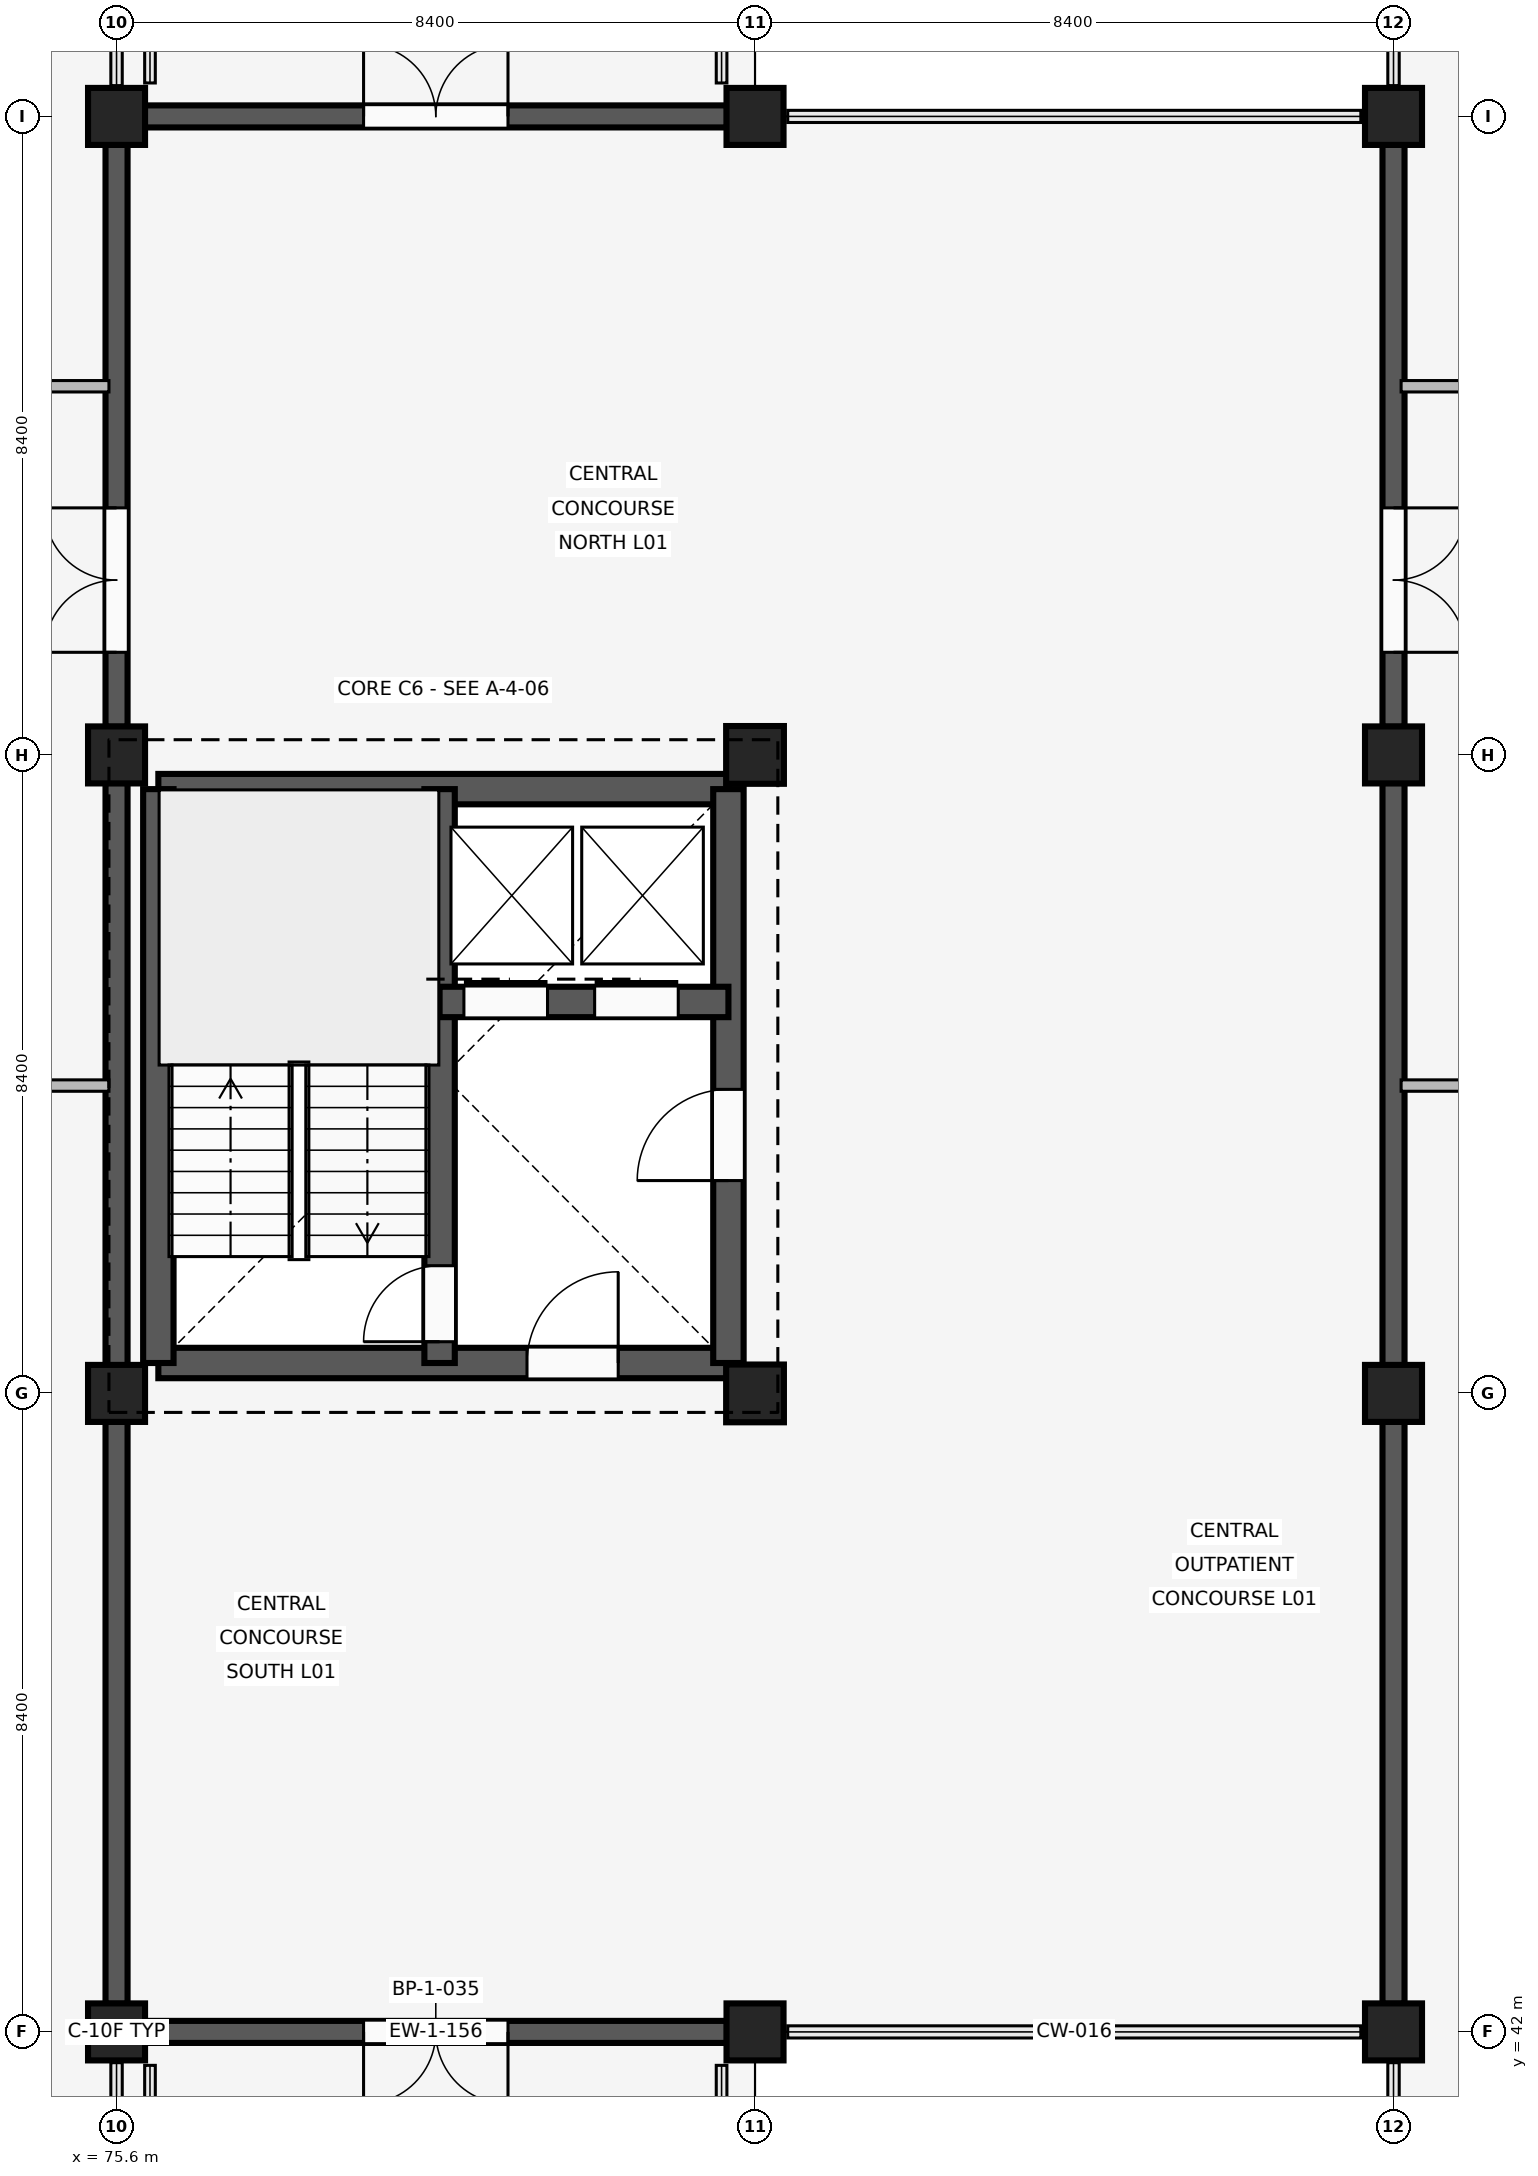
"""IFC4 building model, lengths in metres.
Left out: names, types, materials, properties, quantities, classifications, styles, units other than length and angle.
Written with IfcOpenShell. Run it as: python <this file> out.ifc"""

import sys

from ifc_helpers import new_model, si_unit, direction, frame, frame_2d, origin, origin_2d, place, context, subcontext, project, spatial, rectangle, extrude, element, fill, save


model = new_model("IFC4")
c1 = context("Model", 3, precision=1e-05, world=origin(), true_north=direction((0.0, 1.0)))
c2 = subcontext(c1, "Body", "Model", "MODEL_VIEW")
j1 = project(units=[si_unit("LENGTHUNIT", "METRE"), si_unit("PLANEANGLEUNIT", "RADIAN")], contexts=[c1])
p1 = place(None, origin())
s1 = spatial("IfcSite", under=j1, at=p1, CompositionType="ELEMENT")
p2 = place(p1, origin())
s2 = spatial("IfcBuilding", under=s1, at=p2, CompositionType="ELEMENT")
p3 = place(p2, frame((0.0, 0.0, 4.8)))
s3 = spatial("IfcBuildingStorey", under=s2, at=p3, CompositionType="ELEMENT", Elevation=4.8)
for number, where, z_axis, x_axis in (
    (1, (75.6, 42.0, 0.0), (0.0, 0.0, 1.0), (1.0, 0.0, 0.0)),
    (2, (75.6, 50.4, 0.0), (0.0, 0.0, 1.0), (1.0, 0.0, 0.0)),
    (3, (75.6, 58.8, 0.0), (0.0, 0.0, 1.0), (1.0, 0.0, 0.0)),
    (4, (75.6, 67.2, 0.0), (0.0, 0.0, 1.0), (1.0, 0.0, 0.0)),
    (5, (84.0, 42.0, 0.0), (0.0, 0.0, 1.0), (1.0, 0.0, 0.0)),
):
    element("IfcColumn", number, at=place(p3, frame(where, z_axis=z_axis, x_axis=x_axis)), inside=s3, PredefinedType="COLUMN", context=c2, shape_type="SweptSolid", body=[
        extrude(rectangle(XDim=0.75, YDim=0.75, at=origin_2d()), origin(), (0.0, 0.0, 1.0), 3.3),
    ])
for number, where, z_axis, x_axis in (
    (6, (84.0, 50.4, 0.0), (0.0, 0.0, 1.0), (1.0, 0.0, 0.0)),
    (7, (84.0, 58.8, 0.0), (0.0, 0.0, 1.0), (1.0, 0.0, 0.0)),
):
    element("IfcColumn", number, at=place(p3, frame(where, z_axis=z_axis, x_axis=x_axis)), inside=s3, PredefinedType="COLUMN", context=c2, shape_type="SweptSolid", body=[
        extrude(rectangle(XDim=0.76, YDim=0.76, at=origin_2d()), origin(), (0.0, 0.0, 1.0), 3.3),
    ])
for number, where, z_axis, x_axis in (
    (8, (84.0, 67.2, 0.0), (0.0, 0.0, 1.0), (1.0, 0.0, 0.0)),
    (9, (92.4, 42.0, 0.0), (0.0, 0.0, 1.0), (1.0, 0.0, 0.0)),
    (10, (92.4, 50.4, 0.0), (0.0, 0.0, 1.0), (1.0, 0.0, 0.0)),
    (11, (92.4, 58.8, 0.0), (0.0, 0.0, 1.0), (1.0, 0.0, 0.0)),
    (12, (92.4, 67.2, 0.0), (0.0, 0.0, 1.0), (1.0, 0.0, 0.0)),
):
    element("IfcColumn", number, at=place(p3, frame(where, z_axis=z_axis, x_axis=x_axis)), inside=s3, PredefinedType="COLUMN", context=c2, shape_type="SweptSolid", body=[
        extrude(rectangle(XDim=0.75, YDim=0.75, at=origin_2d()), origin(), (0.0, 0.0, 1.0), 3.3),
    ])
p4 = place(p3, frame((83.63, 42.0, 0.0), z_axis=(0.0, 0.0, 1.0), x_axis=(-1.0, 0.0, 0.0)))
e13 = element("IfcWall", 13, at=p4, inside=s3, PredefinedType="SOLIDWALL", context=c2, shape_type="SweptSolid", body=[
    extrude(rectangle(XDim=7.66, YDim=0.29, at=frame_2d((3.83, 0.0))), origin(), (0.0, 0.0, 1.0), 2.42),
])
p5 = place(p4, frame((2.88, 0.0, 0.0)))
e14 = element("IfcOpeningElement", 14, at=p5, cuts=e13, PredefinedType="OPENING", context=c2, shape_type="SweptSolid", body=[
    extrude(rectangle(XDim=1.9, YDim=2.3, at=frame_2d((0.95, 1.15))), frame((0.0, 0.155, 0.0), z_axis=(0.0, -1.0, 0.0), x_axis=(1.0, 0.0, 0.0)), (0.0, 0.0, 1.0), 0.31),
])
for number, where, z_axis, x_axis in (
    (15, (75.6, 42.37, 0.0), (0.0, 0.0, 1.0), (0.0, 1.0, 0.0)),
    (16, (75.6, 50.77, 0.0), (0.0, 0.0, 1.0), (0.0, 1.0, 0.0)),
):
    element("IfcWall", number, at=place(p3, frame(where, z_axis=z_axis, x_axis=x_axis)), inside=s3, PredefinedType="SOLIDWALL", context=c2, shape_type="SweptSolid", body=[
        extrude(rectangle(XDim=7.66, YDim=0.29, at=frame_2d((3.83, 0.0))), origin(), (0.0, 0.0, 1.0), 2.42),
    ])
p6 = place(p3, frame((75.97, 67.2, 0.0), z_axis=(0.0, 0.0, 1.0), x_axis=(1.0, 0.0, 0.0)))
e17 = element("IfcWall", 17, at=p6, inside=s3, PredefinedType="SOLIDWALL", context=c2, shape_type="SweptSolid", body=[
    extrude(rectangle(XDim=7.66, YDim=0.29, at=frame_2d((3.83, 0.0))), origin(), (0.0, 0.0, 1.0), 2.42),
])
p7 = place(p6, frame((2.88, 0.0, 0.0)))
e18 = element("IfcOpeningElement", 18, at=p7, cuts=e17, PredefinedType="OPENING", context=c2, shape_type="SweptSolid", body=[
    extrude(rectangle(XDim=1.9, YDim=2.3, at=frame_2d((0.95, 1.15))), frame((0.0, 0.155, 0.0), z_axis=(0.0, -1.0, 0.0), x_axis=(1.0, 0.0, 0.0)), (0.0, 0.0, 1.0), 0.31),
])
p8 = place(p3, frame((75.6, 59.17, 0.0), z_axis=(0.0, 0.0, 1.0), x_axis=(0.0, 1.0, 0.0)))
e19 = element("IfcWall", 19, at=p8, inside=s3, PredefinedType="SOLIDWALL", context=c2, shape_type="SweptSolid", body=[
    extrude(rectangle(XDim=7.66, YDim=0.29, at=frame_2d((3.83, 0.0))), origin(), (0.0, 0.0, 1.0), 2.42),
])
p9 = place(p8, frame((0.98, 0.0, 0.0)))
e20 = element("IfcOpeningElement", 20, at=p9, cuts=e19, PredefinedType="OPENING", context=c2, shape_type="SweptSolid", body=[
    extrude(rectangle(XDim=1.9, YDim=2.32, at=frame_2d((0.95, 1.16))), frame((0.0, 0.155, 0.0), z_axis=(0.0, -1.0, 0.0), x_axis=(1.0, 0.0, 0.0)), (0.0, 0.0, 1.0), 0.31),
])
for number, where, z_axis, x_axis in (
    (21, (92.4, 50.03, 0.0), (0.0, 0.0, 1.0), (0.0, -1.0, 0.0)),
    (22, (92.4, 58.43, 0.0), (0.0, 0.0, 1.0), (0.0, -1.0, 0.0)),
):
    element("IfcWall", number, at=place(p3, frame(where, z_axis=z_axis, x_axis=x_axis)), inside=s3, PredefinedType="SOLIDWALL", context=c2, shape_type="SweptSolid", body=[
        extrude(rectangle(XDim=7.66, YDim=0.29, at=frame_2d((3.83, 0.0))), origin(), (0.0, 0.0, 1.0), 2.42),
    ])
p10 = place(p3, frame((92.4, 66.83, 0.0), z_axis=(0.0, 0.0, 1.0), x_axis=(0.0, -1.0, 0.0)))
e23 = element("IfcWall", 23, at=p10, inside=s3, PredefinedType="SOLIDWALL", context=c2, shape_type="SweptSolid", body=[
    extrude(rectangle(XDim=7.66, YDim=0.29, at=frame_2d((3.83, 0.0))), origin(), (0.0, 0.0, 1.0), 2.42),
])
p11 = place(p10, frame((4.78, 0.0, 0.0)))
e24 = element("IfcOpeningElement", 24, at=p11, cuts=e23, PredefinedType="OPENING", context=c2, shape_type="SweptSolid", body=[
    extrude(rectangle(XDim=1.9, YDim=2.32, at=frame_2d((0.95, 1.16))), frame((0.0, 0.155, 0.0), z_axis=(0.0, -1.0, 0.0), x_axis=(1.0, 0.0, 0.0)), (0.0, 0.0, 1.0), 0.31),
])
p12 = place(p3, frame((76.15, 50.8, 0.0), z_axis=(0.0, 0.0, 1.0), x_axis=(1.0, 0.0, 0.0)))
e25 = element("IfcWall", 25, at=p12, inside=s3, PredefinedType="SHEAR", context=c2, shape_type="SweptSolid", body=[
    extrude(rectangle(XDim=7.5, YDim=0.4, at=frame_2d((3.75, 0.0))), origin(), (0.0, 0.0, 1.0), 3.02),
])
p13 = place(p12, frame((4.85, 0.0, 0.0)))
e26 = element("IfcOpeningElement", 26, at=p13, cuts=e25, PredefinedType="OPENING", context=c2, shape_type="SweptSolid", body=[
    extrude(rectangle(XDim=1.2, YDim=2.1, at=frame_2d((0.6, 1.05))), frame((0.0, 0.21, 0.0), z_axis=(0.0, -1.0, 0.0), x_axis=(1.0, 0.0, 0.0)), (0.0, 0.0, 1.0), 0.42),
])
p14 = place(p3, frame((76.15, 58.35, 0.0), z_axis=(0.0, 0.0, 1.0), x_axis=(1.0, 0.0, 0.0)))
e27 = element("IfcWall", 27, at=p14, inside=s3, PredefinedType="SHEAR", context=c2, shape_type="SweptSolid", body=[
    extrude(rectangle(XDim=7.5, YDim=0.4, at=frame_2d((3.75, 0.0))), origin(), (0.0, 0.0, 1.0), 3.02),
])
p15 = place(p3, frame((76.15, 50.8, 0.0), z_axis=(0.0, 0.0, 1.0), x_axis=(0.0, 1.0, 0.0)))
e28 = element("IfcWall", 28, at=p15, inside=s3, PredefinedType="SHEAR", context=c2, shape_type="SweptSolid", body=[
    extrude(rectangle(XDim=7.55, YDim=0.4, at=frame_2d((3.775, 0.0))), origin(), (0.0, 0.0, 1.0), 3.02),
])
p16 = place(p3, frame((83.65, 50.8, 0.0), z_axis=(0.0, 0.0, 1.0), x_axis=(0.0, 1.0, 0.0)))
e29 = element("IfcWall", 29, at=p16, inside=s3, PredefinedType="SHEAR", context=c2, shape_type="SweptSolid", body=[
    extrude(rectangle(XDim=7.55, YDim=0.4, at=frame_2d((3.775, 0.0))), origin(), (0.0, 0.0, 1.0), 3.02),
])
p17 = place(p16, frame((2.4, 0.0, 0.0)))
e30 = element("IfcOpeningElement", 30, at=p17, cuts=e29, PredefinedType="OPENING", context=c2, shape_type="SweptSolid", body=[
    extrude(rectangle(XDim=1.2, YDim=2.2, at=frame_2d((0.6, 1.1))), frame((0.0, 0.21, 0.0), z_axis=(0.0, -1.0, 0.0), x_axis=(1.0, 0.0, 0.0)), (0.0, 0.0, 1.0), 0.42),
])
p18 = place(p3, frame((79.85, 50.8, 0.0), z_axis=(0.0, 0.0, 1.0), x_axis=(0.0, 1.0, 0.0)))
e31 = element("IfcWall", 31, at=p18, inside=s3, PredefinedType="SHEAR", context=c2, shape_type="SweptSolid", body=[
    extrude(rectangle(XDim=7.55, YDim=0.4, at=frame_2d((3.775, 0.0))), origin(), (0.0, 0.0, 1.0), 3.02),
])
p19 = place(p18, frame((0.28, 0.0, 0.0)))
e32 = element("IfcOpeningElement", 32, at=p19, cuts=e31, PredefinedType="OPENING", context=c2, shape_type="SweptSolid", body=[
    extrude(rectangle(XDim=1.0, YDim=2.15, at=frame_2d((0.5, 1.075))), frame((0.0, 0.21, 0.0), z_axis=(0.0, -1.0, 0.0), x_axis=(1.0, 0.0, 0.0)), (0.0, 0.0, 1.0), 0.42),
])
p20 = place(p3, frame((79.85, 55.55, 0.0), z_axis=(0.0, 0.0, 1.0), x_axis=(1.0, 0.0, 0.0)))
e33 = element("IfcWall", 33, at=p20, inside=s3, PredefinedType="SHEAR", context=c2, shape_type="SweptSolid", body=[
    extrude(rectangle(XDim=3.8, YDim=0.4, at=frame_2d((1.9, 0.0))), origin(), (0.0, 0.0, 1.0), 3.02),
])
p21 = place(p20, frame((0.32, 0.0, 0.0)))
e34 = element("IfcOpeningElement", 34, at=p21, cuts=e33, PredefinedType="OPENING", context=c2, shape_type="SweptSolid", body=[
    extrude(rectangle(XDim=1.1, YDim=2.15, at=frame_2d((0.55, 1.075))), frame((0.0, 0.21, 0.0), z_axis=(0.0, -1.0, 0.0), x_axis=(1.0, 0.0, 0.0)), (0.0, 0.0, 1.0), 0.42),
])
p22 = place(p20, frame((2.04, 0.0, 0.0)))
e35 = element("IfcOpeningElement", 35, at=p22, cuts=e33, PredefinedType="OPENING", context=c2, shape_type="SweptSolid", body=[
    extrude(rectangle(XDim=1.1, YDim=2.15, at=frame_2d((0.55, 1.075))), frame((0.0, 0.21, 0.0), z_axis=(0.0, -1.0, 0.0), x_axis=(1.0, 0.0, 0.0)), (0.0, 0.0, 1.0), 0.42),
])
p23 = place(p3, frame((46.9, 54.45, 0.0), z_axis=(0.0, 0.0, 1.0), x_axis=(1.0, 0.0, 0.0)))
e36 = element("IfcWall", 36, at=p23, inside=s3, PredefinedType="PARTITIONING", context=c2, shape_type="SweptSolid", body=[
    extrude(rectangle(XDim=28.6, YDim=0.15, at=frame_2d((14.3, 0.0))), origin(), (0.0, 0.0, 1.0), 2.59),
])
p24 = place(p23, frame((2.6, 0.0, 0.0)))
e37 = element("IfcOpeningElement", 37, at=p24, cuts=e36, PredefinedType="OPENING", context=c2, shape_type="SweptSolid", body=[
    extrude(rectangle(XDim=1.0, YDim=2.15, at=frame_2d((0.5, 1.075))), frame((0.0, 0.085, 0.0), z_axis=(0.0, -1.0, 0.0), x_axis=(1.0, 0.0, 0.0)), (0.0, 0.0, 1.0), 0.17),
])
p25 = place(p3, frame((46.9, 63.65, 0.0), z_axis=(0.0, 0.0, 1.0), x_axis=(1.0, 0.0, 0.0)))
e38 = element("IfcWall", 38, at=p25, inside=s3, PredefinedType="PARTITIONING", context=c2, shape_type="SweptSolid", body=[
    extrude(rectangle(XDim=28.6, YDim=0.15, at=frame_2d((14.3, 0.0))), origin(), (0.0, 0.0, 1.0), 2.59),
])
p26 = place(p25, frame((2.6, 0.0, 0.0)))
e39 = element("IfcOpeningElement", 39, at=p26, cuts=e38, PredefinedType="OPENING", context=c2, shape_type="SweptSolid", body=[
    extrude(rectangle(XDim=1.05, YDim=2.2, at=frame_2d((0.525, 1.1))), frame((0.0, 0.085, 0.0), z_axis=(0.0, -1.0, 0.0), x_axis=(1.0, 0.0, 0.0)), (0.0, 0.0, 1.0), 0.17),
])
p27 = place(p3, frame((92.5, 54.45, 0.0), z_axis=(0.0, 0.0, 1.0), x_axis=(1.0, 0.0, 0.0)))
e40 = element("IfcWall", 40, at=p27, inside=s3, PredefinedType="PARTITIONING", context=c2, shape_type="SweptSolid", body=[
    extrude(rectangle(XDim=28.6, YDim=0.15, at=frame_2d((14.3, 0.0))), origin(), (0.0, 0.0, 1.0), 2.59),
])
p28 = place(p27, frame((2.6, 0.0, 0.0)))
e41 = element("IfcOpeningElement", 41, at=p28, cuts=e40, PredefinedType="OPENING", context=c2, shape_type="SweptSolid", body=[
    extrude(rectangle(XDim=1.0, YDim=2.15, at=frame_2d((0.5, 1.075))), frame((0.0, 0.085, 0.0), z_axis=(0.0, -1.0, 0.0), x_axis=(1.0, 0.0, 0.0)), (0.0, 0.0, 1.0), 0.17),
])
p29 = place(p3, frame((92.5, 63.65, 0.0), z_axis=(0.0, 0.0, 1.0), x_axis=(1.0, 0.0, 0.0)))
e42 = element("IfcWall", 42, at=p29, inside=s3, PredefinedType="PARTITIONING", context=c2, shape_type="SweptSolid", body=[
    extrude(rectangle(XDim=28.6, YDim=0.15, at=frame_2d((14.3, 0.0))), origin(), (0.0, 0.0, 1.0), 2.59),
])
p30 = place(p29, frame((2.6, 0.0, 0.0)))
e43 = element("IfcOpeningElement", 43, at=p30, cuts=e42, PredefinedType="OPENING", context=c2, shape_type="SweptSolid", body=[
    extrude(rectangle(XDim=1.05, YDim=2.2, at=frame_2d((0.525, 1.1))), frame((0.0, 0.085, 0.0), z_axis=(0.0, -1.0, 0.0), x_axis=(1.0, 0.0, 0.0)), (0.0, 0.0, 1.0), 0.17),
])
p31 = place(p5, origin())
e44 = element("IfcDoor", 44, at=p31, inside=s3, OperationType="DOUBLE_SWING_LEFT", PredefinedType="DOOR", context=c2, shape_type="SweptSolid", body=[
    extrude(rectangle(XDim=1.9, YDim=2.3, at=frame_2d((0.95, 1.15))), frame((0.0, 0.025, 0.0), z_axis=(0.0, -1.0, 0.0), x_axis=(1.0, 0.0, 0.0)), (0.0, 0.0, 1.0), 0.05),
])
fill(e14, e44)
p32 = place(p7, origin())
e45 = element("IfcDoor", 45, at=p32, inside=s3, OperationType="DOUBLE_SWING_LEFT", PredefinedType="DOOR", context=c2, shape_type="SweptSolid", body=[
    extrude(rectangle(XDim=1.9, YDim=2.3, at=frame_2d((0.95, 1.15))), frame((0.0, 0.025, 0.0), z_axis=(0.0, -1.0, 0.0), x_axis=(1.0, 0.0, 0.0)), (0.0, 0.0, 1.0), 0.05),
])
fill(e18, e45)
p33 = place(p9, origin())
e46 = element("IfcDoor", 46, at=p33, inside=s3, OperationType="DOUBLE_SWING_LEFT", PredefinedType="DOOR", context=c2, shape_type="SweptSolid", body=[
    extrude(rectangle(XDim=1.9, YDim=2.32, at=frame_2d((0.95, 1.16))), frame((0.0, 0.025, 0.0), z_axis=(0.0, -1.0, 0.0), x_axis=(1.0, 0.0, 0.0)), (0.0, 0.0, 1.0), 0.05),
])
fill(e20, e46)
p34 = place(p11, origin())
e47 = element("IfcDoor", 47, at=p34, inside=s3, OperationType="DOUBLE_SWING_LEFT", PredefinedType="DOOR", context=c2, shape_type="SweptSolid", body=[
    extrude(rectangle(XDim=1.9, YDim=2.32, at=frame_2d((0.95, 1.16))), frame((0.0, 0.025, 0.0), z_axis=(0.0, -1.0, 0.0), x_axis=(1.0, 0.0, 0.0)), (0.0, 0.0, 1.0), 0.05),
])
fill(e24, e47)
p35 = place(p17, origin())
e48 = element("IfcDoor", 48, at=p35, inside=s3, OperationType="SINGLE_SWING_LEFT", PredefinedType="DOOR", context=c2, shape_type="SweptSolid", body=[
    extrude(rectangle(XDim=1.2, YDim=2.2, at=frame_2d((0.6, 1.1))), frame((0.0, 0.025, 0.0), z_axis=(0.0, -1.0, 0.0), x_axis=(1.0, 0.0, 0.0)), (0.0, 0.0, 1.0), 0.05),
])
fill(e30, e48)
p36 = place(p13, origin())
e49 = element("IfcDoor", 49, at=p36, inside=s3, OperationType="SINGLE_SWING_RIGHT", PredefinedType="DOOR", context=c2, shape_type="SweptSolid", body=[
    extrude(rectangle(XDim=1.2, YDim=2.1, at=frame_2d((0.6, 1.05))), frame((0.0, 0.025, 0.0), z_axis=(0.0, -1.0, 0.0), x_axis=(1.0, 0.0, 0.0)), (0.0, 0.0, 1.0), 0.05),
])
fill(e26, e49)
p37 = place(p19, origin())
e50 = element("IfcDoor", 50, at=p37, inside=s3, OperationType="SINGLE_SWING_LEFT", PredefinedType="DOOR", context=c2, shape_type="SweptSolid", body=[
    extrude(rectangle(XDim=1.0, YDim=2.15, at=frame_2d((0.5, 1.075))), frame((0.0, 0.025, 0.0), z_axis=(0.0, -1.0, 0.0), x_axis=(1.0, 0.0, 0.0)), (0.0, 0.0, 1.0), 0.05),
])
fill(e32, e50)
p38 = place(p21, origin())
e51 = element("IfcDoor", 51, at=p38, inside=s3, OperationType="SLIDING_TO_LEFT", PredefinedType="DOOR", context=c2, shape_type="SweptSolid", body=[
    extrude(rectangle(XDim=1.1, YDim=2.15, at=frame_2d((0.55, 1.075))), frame((0.0, 0.025, 0.0), z_axis=(0.0, -1.0, 0.0), x_axis=(1.0, 0.0, 0.0)), (0.0, 0.0, 1.0), 0.05),
])
fill(e34, e51)
p39 = place(p22, origin())
e52 = element("IfcDoor", 52, at=p39, inside=s3, OperationType="SLIDING_TO_LEFT", PredefinedType="DOOR", context=c2, shape_type="SweptSolid", body=[
    extrude(rectangle(XDim=1.1, YDim=2.15, at=frame_2d((0.55, 1.075))), frame((0.0, 0.025, 0.0), z_axis=(0.0, -1.0, 0.0), x_axis=(1.0, 0.0, 0.0)), (0.0, 0.0, 1.0), 0.05),
])
fill(e35, e52)
save(model, sys.argv[1])
